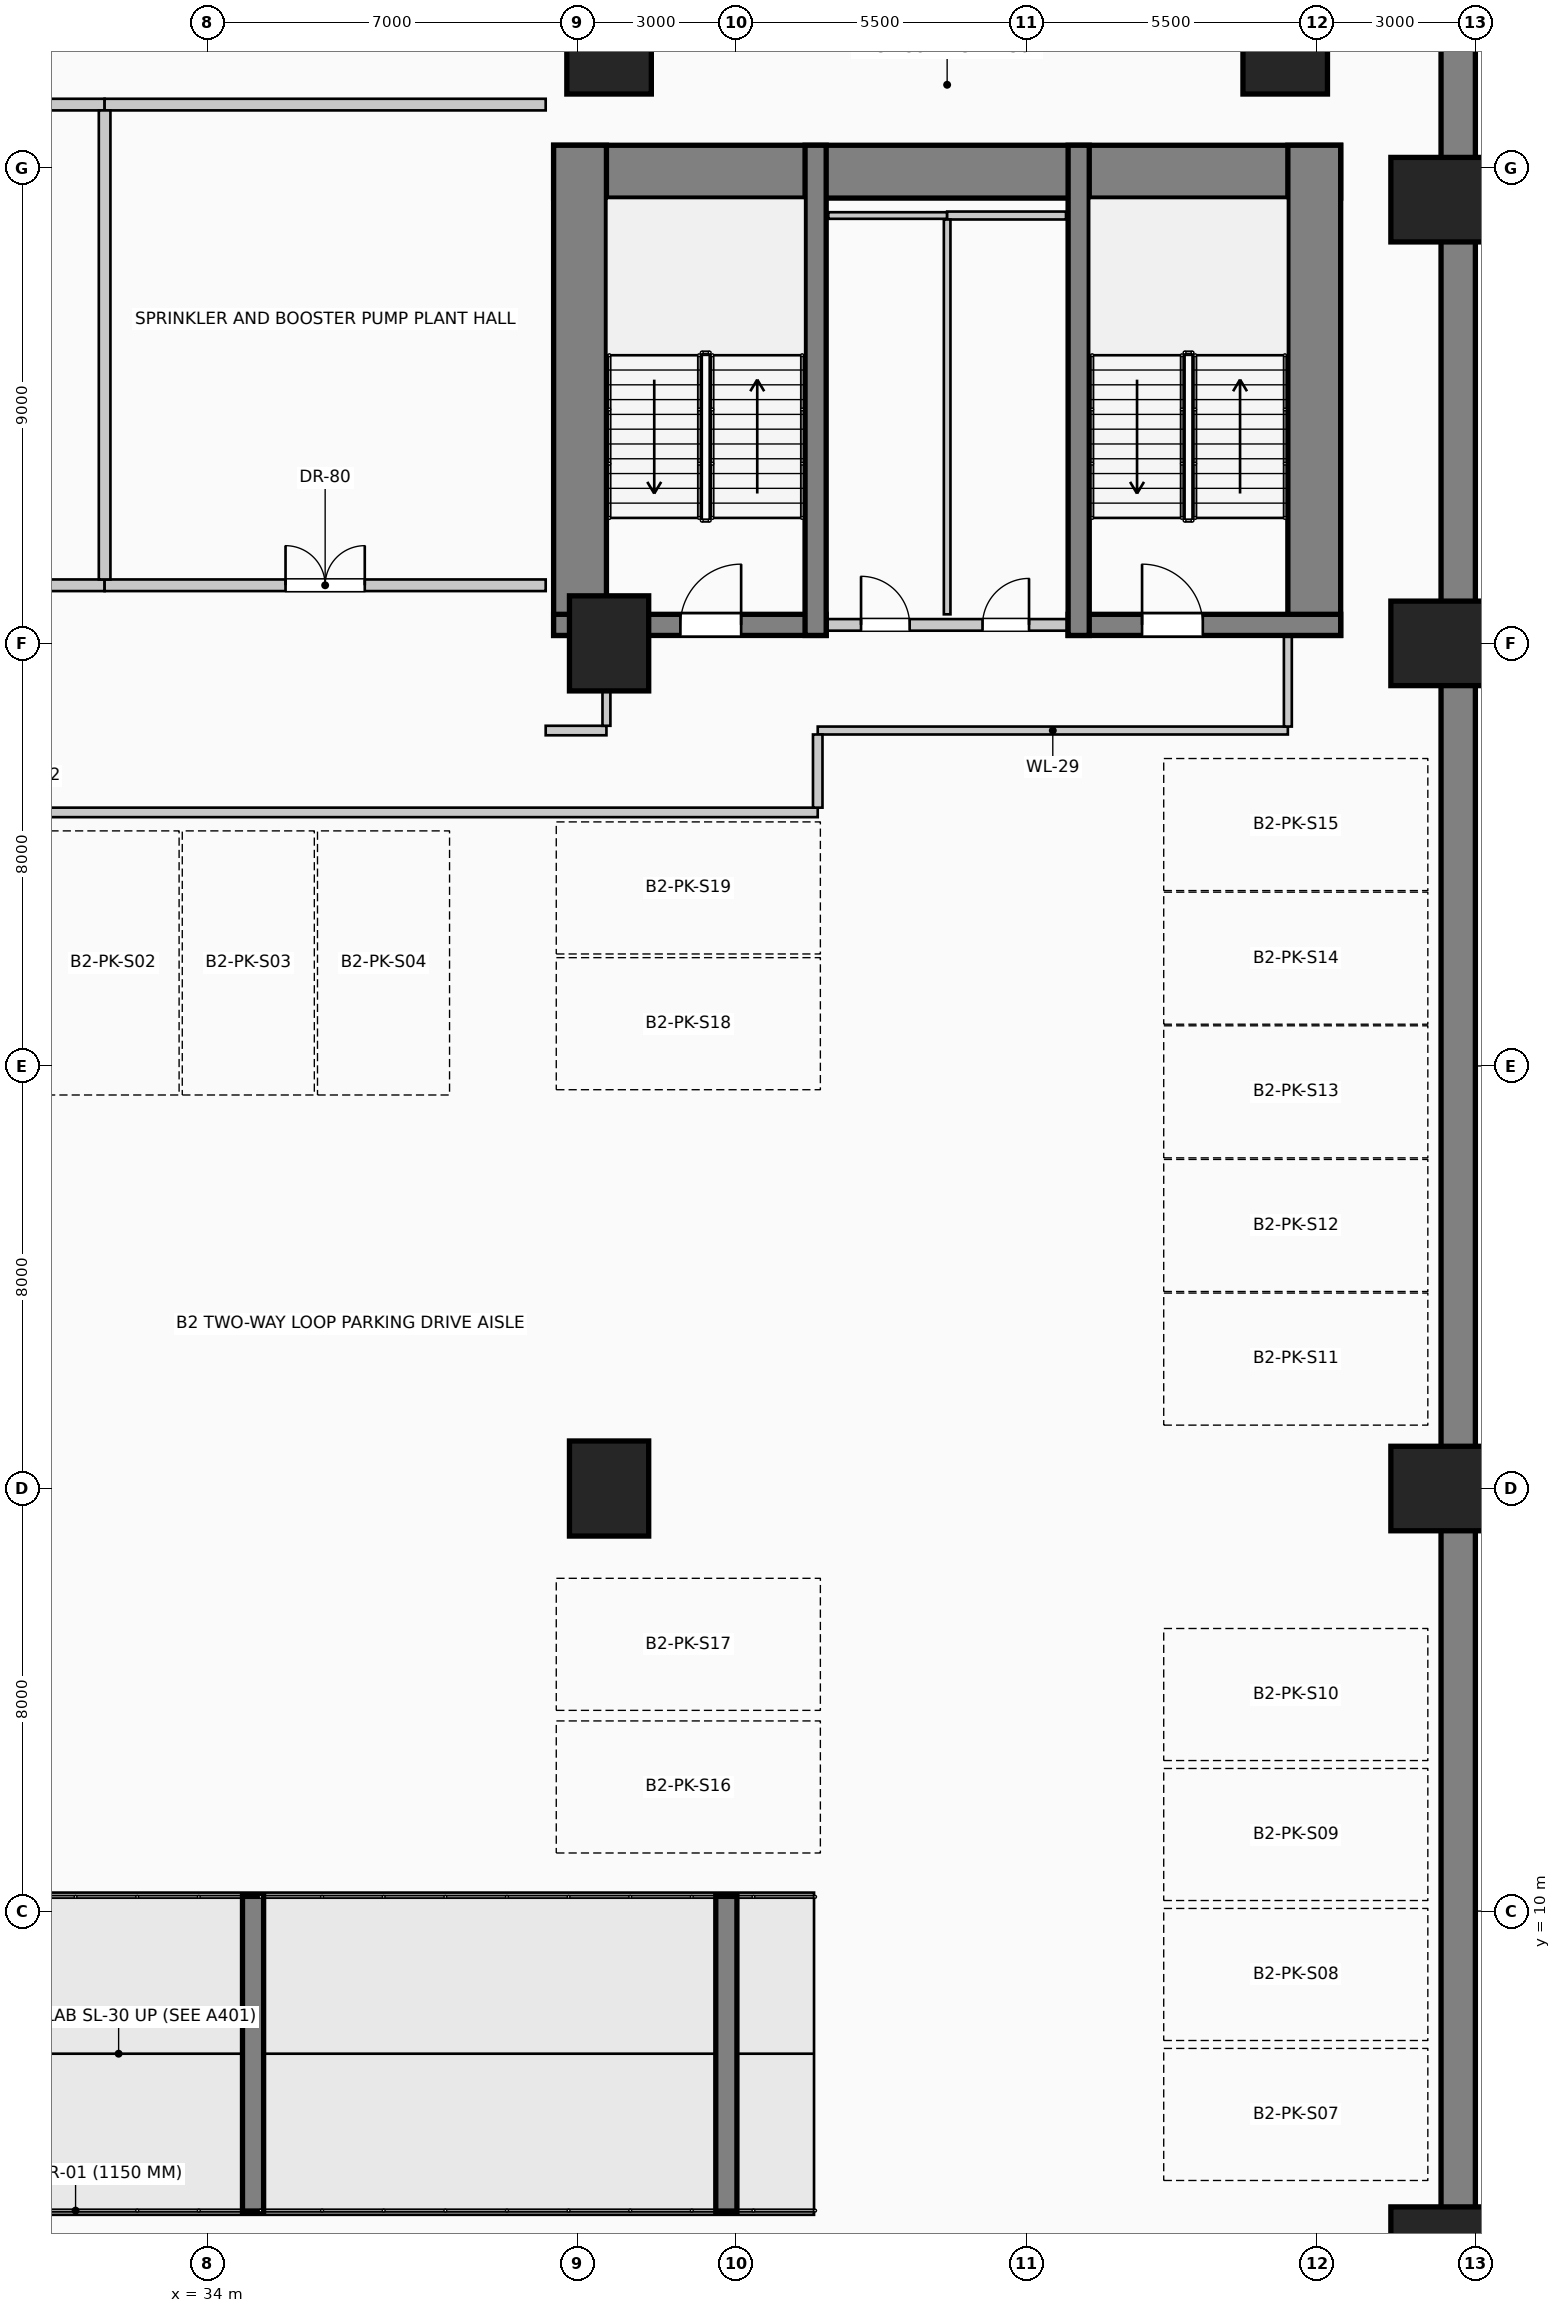
"""IFC4 building model, lengths in metres.
Left out: names, types, materials, properties, quantities, classifications, styles, units other than length and angle.
Written with IfcOpenShell. Run it as: python <this file> out.ifc"""

import sys

from ifc_helpers import new_model, si_unit, direction, frame, frame_2d, origin, origin_2d, place, context, subcontext, project, spatial, rectangle, extrude, element, fill, save


model = new_model("IFC4")
c1 = context("Model", 3, precision=1e-05, world=origin(), true_north=direction((0.0, 1.0)))
c2 = subcontext(c1, "Body", "Model", "MODEL_VIEW")
j1 = project(units=[si_unit("LENGTHUNIT", "METRE"), si_unit("PLANEANGLEUNIT", "RADIAN")], contexts=[c1])
p1 = place(None, origin())
s1 = spatial("IfcSite", under=j1, at=p1, CompositionType="ELEMENT")
p2 = place(p1, origin())
s2 = spatial("IfcBuilding", under=s1, at=p2, CompositionType="ELEMENT")
p3 = place(p2, frame((0.0, 0.0, -9.0)))
s3 = spatial("IfcBuildingStorey", under=s2, at=p3, CompositionType="ELEMENT", Elevation=-9.0)
p4 = place(p3, frame((57.675, 46.0, 0.0), z_axis=(0.0, 0.0, 1.0), x_axis=(0.0, -1.0, 0.0)))
e1 = element("IfcWall", 1, at=p4, inside=s3, PredefinedType="SOLIDWALL", context=c2, shape_type="SweptSolid", body=[
    extrude(rectangle(XDim=46.0, YDim=0.65, at=frame_2d((23.0, 0.0))), origin(), (0.0, 0.0, 1.0), 4.5),
])
p5 = place(p3, frame((40.55, 42.93, 0.0), z_axis=(0.0, 0.0, 1.0), x_axis=(1.0, 0.0, 0.0)))
e2 = element("IfcWall", 2, at=p5, inside=s3, PredefinedType="SHEAR", context=c2, shape_type="SweptSolid", body=[
    extrude(rectangle(XDim=14.9, YDim=1.0, at=frame_2d((7.45, 0.0))), origin(), (0.0, 0.0, 1.0), 4.5),
])
for number, where, z_axis, x_axis in (
    (3, (41.05, 34.15, 0.0), (0.0, 0.0, 1.0), (0.0, 1.0, 0.0)),
    (4, (54.95, 34.15, 0.0), (0.0, 0.0, 1.0), (0.0, 1.0, 0.0)),
):
    element("IfcWall", number, at=place(p3, frame(where, z_axis=z_axis, x_axis=x_axis)), inside=s3, PredefinedType="SHEAR", context=c2, shape_type="SweptSolid", body=[
        extrude(rectangle(XDim=9.28, YDim=1.0, at=frame_2d((4.64, 0.0))), origin(), (0.0, 0.0, 1.0), 4.5),
    ])
p6 = place(p3, frame((40.55, 34.35, 0.0), z_axis=(0.0, 0.0, 1.0), x_axis=(1.0, 0.0, 0.0)))
e5 = element("IfcWall", 5, at=p6, inside=s3, PredefinedType="SHEAR", context=c2, shape_type="SweptSolid", body=[
    extrude(rectangle(XDim=5.16, YDim=0.4, at=frame_2d((2.58, 0.0))), origin(), (0.0, 0.0, 1.0), 4.5),
])
p7 = place(p6, frame((2.4, 0.0, 0.0)))
e6 = element("IfcOpeningElement", 6, at=p7, cuts=e5, PredefinedType="OPENING", context=c2, shape_type="SweptSolid", body=[
    extrude(rectangle(XDim=1.15, YDim=2.2, at=frame_2d((0.575, 1.1))), frame((0.0, 0.21, 0.0), z_axis=(0.0, -1.0, 0.0), x_axis=(1.0, 0.0, 0.0)), (0.0, 0.0, 1.0), 0.42),
])
p8 = place(p3, frame((45.51, 34.15, 0.0), z_axis=(0.0, 0.0, 1.0), x_axis=(0.0, 1.0, 0.0)))
e7 = element("IfcWall", 7, at=p8, inside=s3, PredefinedType="SHEAR", context=c2, shape_type="SweptSolid", body=[
    extrude(rectangle(XDim=9.28, YDim=0.4, at=frame_2d((4.64, 0.0))), origin(), (0.0, 0.0, 1.0), 4.5),
])
p9 = place(p3, frame((50.29, 34.35, 0.0), z_axis=(0.0, 0.0, 1.0), x_axis=(1.0, 0.0, 0.0)))
e8 = element("IfcWall", 8, at=p9, inside=s3, PredefinedType="SHEAR", context=c2, shape_type="SweptSolid", body=[
    extrude(rectangle(XDim=5.16, YDim=0.4, at=frame_2d((2.58, 0.0))), origin(), (0.0, 0.0, 1.0), 4.5),
])
p10 = place(p9, frame((1.4, 0.0, 0.0)))
e9 = element("IfcOpeningElement", 9, at=p10, cuts=e8, PredefinedType="OPENING", context=c2, shape_type="SweptSolid", body=[
    extrude(rectangle(XDim=1.15, YDim=2.2, at=frame_2d((0.575, 1.1))), frame((0.0, 0.21, 0.0), z_axis=(0.0, -1.0, 0.0), x_axis=(1.0, 0.0, 0.0)), (0.0, 0.0, 1.0), 0.42),
])
p11 = place(p3, frame((50.49, 34.15, 0.0), z_axis=(0.0, 0.0, 1.0), x_axis=(0.0, 1.0, 0.0)))
e10 = element("IfcWall", 10, at=p11, inside=s3, PredefinedType="SHEAR", context=c2, shape_type="SweptSolid", body=[
    extrude(rectangle(XDim=9.28, YDim=0.4, at=frame_2d((4.64, 0.0))), origin(), (0.0, 0.0, 1.0), 4.5),
])
for number, where, z_axis, x_axis in (
    (11, (41.6, 45.4, 0.0), (0.0, 0.0, 1.0), (1.0, 0.0, 0.0)),
    (12, (54.4, 45.4, 0.0), (0.0, 0.0, 1.0), (1.0, 0.0, 0.0)),
    (13, (57.4, 3.6, 0.0), (0.0, 0.0, 1.0), (0.0, 1.0, 0.0)),
    (14, (57.4, 18.0, 0.0), (0.0, 0.0, 1.0), (0.0, 1.0, 0.0)),
    (15, (57.4, 34.0, 0.0), (0.0, 0.0, 1.0), (0.0, 1.0, 0.0)),
    (16, (57.4, 42.4, 0.0), (0.0, 0.0, 1.0), (0.0, 1.0, 0.0)),
):
    element("IfcColumn", number, at=place(p3, frame(where, z_axis=z_axis, x_axis=x_axis)), inside=s3, PredefinedType="COLUMN", context=c2, shape_type="SweptSolid", body=[
        extrude(rectangle(XDim=1.6, YDim=2.0, at=origin_2d()), origin(), (0.0, 0.0, 1.0), 4.5),
    ])
for number, where, z_axis, x_axis in (
    (17, (41.6, 18.0, 0.0), (0.0, 0.0, 1.0), (1.0, 0.0, 0.0)),
    (18, (41.6, 34.0, 0.0), (0.0, 0.0, 1.0), (1.0, 0.0, 0.0)),
):
    element("IfcColumn", number, at=place(p3, frame(where, z_axis=z_axis, x_axis=x_axis)), inside=s3, PredefinedType="COLUMN", context=c2, shape_type="SweptSolid", body=[
        extrude(rectangle(XDim=1.5, YDim=1.8, at=origin_2d()), origin(), (0.0, 0.0, 1.0), 4.5),
    ])
p12 = place(p3, frame((34.86, 4.3, 0.0), z_axis=(0.0, 0.0, 1.0), x_axis=(0.0, 1.0, 0.0)))
e19 = element("IfcWall", 19, at=p12, inside=s3, PredefinedType="SHEAR", context=c2, shape_type="SweptSolid", body=[
    extrude(rectangle(XDim=6.0, YDim=0.4, at=frame_2d((3.0, 0.0))), origin(), (0.0, 0.0, 1.0), 2.532),
])
p13 = place(p3, frame((43.82, 4.3, 0.0), z_axis=(0.0, 0.0, 1.0), x_axis=(0.0, 1.0, 0.0)))
e20 = element("IfcWall", 20, at=p13, inside=s3, PredefinedType="SHEAR", context=c2, shape_type="SweptSolid", body=[
    extrude(rectangle(XDim=6.0, YDim=0.4, at=frame_2d((3.0, 0.0))), origin(), (0.0, 0.0, 1.0), 3.972),
])
p14 = place(p3, frame((45.72, 34.35, 0.0), z_axis=(0.0, 0.0, 1.0), x_axis=(1.0, 0.0, 0.0)))
e21 = element("IfcWall", 21, at=p14, inside=s3, PredefinedType="PARTITIONING", context=c2, shape_type="SweptSolid", body=[
    extrude(rectangle(XDim=4.56, YDim=0.22, at=frame_2d((2.28, 0.0))), origin(), (0.0, 0.0, 1.0), 3.145),
])
p15 = place(p14, frame((0.65, 0.0, 0.0)))
e22 = element("IfcOpeningElement", 22, at=p15, cuts=e21, PredefinedType="OPENING", context=c2, shape_type="SweptSolid", body=[
    extrude(rectangle(XDim=0.92, YDim=2.1, at=frame_2d((0.46, 1.05))), frame((0.0, 0.12, 0.0), z_axis=(0.0, -1.0, 0.0), x_axis=(1.0, 0.0, 0.0)), (0.0, 0.0, 1.0), 0.24),
])
p16 = place(p14, frame((2.95, 0.0, 0.0)))
e23 = element("IfcOpeningElement", 23, at=p16, cuts=e21, PredefinedType="OPENING", context=c2, shape_type="SweptSolid", body=[
    extrude(rectangle(XDim=0.88, YDim=2.1, at=frame_2d((0.44, 1.05))), frame((0.0, 0.12, 0.0), z_axis=(0.0, -1.0, 0.0), x_axis=(1.0, 0.0, 0.0)), (0.0, 0.0, 1.0), 0.24),
])
p17 = place(p3, frame((15.85, 30.8, 0.0), z_axis=(0.0, 0.0, 1.0), x_axis=(1.0, 0.0, 0.0)))
e24 = element("IfcWall", 24, at=p17, inside=s3, PredefinedType="PARTITIONING", context=c2, shape_type="SweptSolid", body=[
    extrude(rectangle(XDim=29.7, YDim=0.18, at=frame_2d((14.85, 0.0))), origin(), (0.0, 0.0, 1.0), 4.1),
])
p18 = place(p3, frame((40.4, 32.35, 0.0), z_axis=(0.0, 0.0, 1.0), x_axis=(1.0, 0.0, 0.0)))
e25 = element("IfcWall", 25, at=p18, inside=s3, PredefinedType="PARTITIONING", context=c2, shape_type="SweptSolid", body=[
    extrude(rectangle(XDim=1.15, YDim=0.18, at=frame_2d((0.575, 0.0))), origin(), (0.0, 0.0, 1.0), 4.1),
])
p19 = place(p3, frame((45.55, 32.35, 0.0), z_axis=(0.0, 0.0, 1.0), x_axis=(1.0, 0.0, 0.0)))
e26 = element("IfcWall", 26, at=p19, inside=s3, PredefinedType="PARTITIONING", context=c2, shape_type="SweptSolid", body=[
    extrude(rectangle(XDim=8.9, YDim=0.15, at=frame_2d((4.45, 0.0))), origin(), (0.0, 0.0, 1.0), 4.1),
])
p20 = place(p3, frame((30.2, 35.1, 0.0), z_axis=(0.0, 0.0, 1.0), x_axis=(1.0, 0.0, 0.0)))
e27 = element("IfcWall", 27, at=p20, inside=s3, PredefinedType="PARTITIONING", context=c2, shape_type="SweptSolid", body=[
    extrude(rectangle(XDim=1.85, YDim=0.22, at=frame_2d((0.925, 0.0))), origin(), (0.0, 0.0, 1.0), 4.1),
])
p21 = place(p3, frame((32.05, 35.1, 0.0), z_axis=(0.0, 0.0, 1.0), x_axis=(1.0, 0.0, 0.0)))
e28 = element("IfcWall", 28, at=p21, inside=s3, PredefinedType="PARTITIONING", context=c2, shape_type="SweptSolid", body=[
    extrude(rectangle(XDim=8.35, YDim=0.22, at=frame_2d((4.175, 0.0))), origin(), (0.0, 0.0, 1.0), 4.1),
])
p22 = place(p21, frame((3.425, 0.0, 0.0)))
e29 = element("IfcOpeningElement", 29, at=p22, cuts=e28, PredefinedType="OPENING", context=c2, shape_type="SweptSolid", body=[
    extrude(rectangle(XDim=1.5, YDim=2.25, at=frame_2d((0.75, 1.125))), frame((0.0, 0.12, 0.0), z_axis=(0.0, -1.0, 0.0), x_axis=(1.0, 0.0, 0.0)), (0.0, 0.0, 1.0), 0.24),
])
p23 = place(p3, frame((45.75, 42.1, 0.0), z_axis=(0.0, 0.0, 1.0), x_axis=(1.0, 0.0, 0.0)))
e30 = element("IfcWall", 30, at=p23, inside=s3, PredefinedType="PARTITIONING", context=c2, shape_type="SweptSolid", body=[
    extrude(rectangle(XDim=2.25, YDim=0.125, at=frame_2d((1.125, 0.0))), origin(), (0.0, 0.0, 1.0), 4.1),
])
p24 = place(p3, frame((48.0, 42.1, 0.0), z_axis=(0.0, 0.0, 1.0), x_axis=(1.0, 0.0, 0.0)))
e31 = element("IfcWall", 31, at=p24, inside=s3, PredefinedType="PARTITIONING", context=c2, shape_type="SweptSolid", body=[
    extrude(rectangle(XDim=2.25, YDim=0.15, at=frame_2d((1.125, 0.0))), origin(), (0.0, 0.0, 1.0), 4.1),
])
p25 = place(p3, frame((17.55, 44.2, 0.0), z_axis=(0.0, 0.0, 1.0), x_axis=(1.0, 0.0, 0.0)))
e32 = element("IfcWall", 32, at=p25, inside=s3, PredefinedType="PARTITIONING", context=c2, shape_type="SweptSolid", body=[
    extrude(rectangle(XDim=14.5, YDim=0.22, at=frame_2d((7.25, 0.0))), origin(), (0.0, 0.0, 1.0), 4.1),
])
p26 = place(p3, frame((32.05, 44.2, 0.0), z_axis=(0.0, 0.0, 1.0), x_axis=(1.0, 0.0, 0.0)))
e33 = element("IfcWall", 33, at=p26, inside=s3, PredefinedType="PARTITIONING", context=c2, shape_type="SweptSolid", body=[
    extrude(rectangle(XDim=8.35, YDim=0.22, at=frame_2d((4.175, 0.0))), origin(), (0.0, 0.0, 1.0), 4.1),
])
p27 = place(p3, frame((32.05, 35.21, 0.0), z_axis=(0.0, 0.0, 1.0), x_axis=(0.0, 1.0, 0.0)))
e34 = element("IfcWall", 34, at=p27, inside=s3, PredefinedType="PARTITIONING", context=c2, shape_type="SweptSolid", body=[
    extrude(rectangle(XDim=8.88, YDim=0.22, at=frame_2d((4.44, 0.0))), origin(), (0.0, 0.0, 1.0), 4.1),
])
p28 = place(p3, frame((41.55, 32.44, 0.0), z_axis=(0.0, 0.0, 1.0), x_axis=(0.0, 1.0, 0.0)))
e35 = element("IfcWall", 35, at=p28, inside=s3, PredefinedType="PARTITIONING", context=c2, shape_type="SweptSolid", body=[
    extrude(rectangle(XDim=0.66, YDim=0.15, at=frame_2d((0.33, 0.0))), origin(), (0.0, 0.0, 1.0), 3.145),
])
p29 = place(p3, frame((45.55, 30.89, 0.0), z_axis=(0.0, 0.0, 1.0), x_axis=(0.0, 1.0, 0.0)))
e36 = element("IfcWall", 36, at=p29, inside=s3, PredefinedType="PARTITIONING", context=c2, shape_type="SweptSolid", body=[
    extrude(rectangle(XDim=1.385, YDim=0.18, at=frame_2d((0.692, 0.0))), origin(), (0.0, 0.0, 1.0), 4.1),
])
p30 = place(p3, frame((48.0, 34.55, 0.0), z_axis=(0.0, 0.0, 1.0), x_axis=(0.0, 1.0, 0.0)))
e37 = element("IfcWall", 37, at=p30, inside=s3, PredefinedType="PARTITIONING", context=c2, shape_type="SweptSolid", body=[
    extrude(rectangle(XDim=7.475, YDim=0.125, at=frame_2d((3.737, 0.0))), origin(), (0.0, 0.0, 1.0), 4.1),
])
p31 = place(p3, frame((54.45, 32.425, 0.0), z_axis=(0.0, 0.0, 1.0), x_axis=(0.0, 1.0, 0.0)))
e38 = element("IfcWall", 38, at=p31, inside=s3, PredefinedType="PARTITIONING", context=c2, shape_type="SweptSolid", body=[
    extrude(rectangle(XDim=1.725, YDim=0.15, at=frame_2d((0.862, 0.0))), origin(), (0.0, 0.0, 1.0), 4.1),
])
p32 = place(p7, origin())
e39 = element("IfcDoor", 39, at=p32, inside=s3, OperationType="SINGLE_SWING_RIGHT", PredefinedType="DOOR", context=c2, shape_type="SweptSolid", body=[
    extrude(rectangle(XDim=1.15, YDim=2.2, at=frame_2d((0.575, 1.1))), frame((0.0, 0.025, 0.0), z_axis=(0.0, -1.0, 0.0), x_axis=(1.0, 0.0, 0.0)), (0.0, 0.0, 1.0), 0.05),
])
fill(e6, e39)
p33 = place(p15, origin())
e40 = element("IfcDoor", 40, at=p33, inside=s3, OperationType="SINGLE_SWING_LEFT", PredefinedType="DOOR", context=c2, shape_type="SweptSolid", body=[
    extrude(rectangle(XDim=0.92, YDim=2.1, at=frame_2d((0.46, 1.05))), frame((0.0, 0.025, 0.0), z_axis=(0.0, -1.0, 0.0), x_axis=(1.0, 0.0, 0.0)), (0.0, 0.0, 1.0), 0.05),
])
fill(e22, e40)
p34 = place(p16, origin())
e41 = element("IfcDoor", 41, at=p34, inside=s3, OperationType="SINGLE_SWING_RIGHT", PredefinedType="DOOR", context=c2, shape_type="SweptSolid", body=[
    extrude(rectangle(XDim=0.88, YDim=2.1, at=frame_2d((0.44, 1.05))), frame((0.0, 0.025, 0.0), z_axis=(0.0, -1.0, 0.0), x_axis=(1.0, 0.0, 0.0)), (0.0, 0.0, 1.0), 0.05),
])
fill(e23, e41)
p35 = place(p10, origin())
e42 = element("IfcDoor", 42, at=p35, inside=s3, OperationType="SINGLE_SWING_LEFT", PredefinedType="DOOR", context=c2, shape_type="SweptSolid", body=[
    extrude(rectangle(XDim=1.15, YDim=2.2, at=frame_2d((0.575, 1.1))), frame((0.0, 0.025, 0.0), z_axis=(0.0, -1.0, 0.0), x_axis=(1.0, 0.0, 0.0)), (0.0, 0.0, 1.0), 0.05),
])
fill(e9, e42)
p36 = place(p22, origin())
e43 = element("IfcDoor", 43, at=p36, inside=s3, OperationType="DOUBLE_DOOR_SINGLE_SWING", PredefinedType="DOOR", context=c2, shape_type="SweptSolid", body=[
    extrude(rectangle(XDim=1.5, YDim=2.25, at=frame_2d((0.75, 1.125))), frame((0.0, 0.025, 0.0), z_axis=(0.0, -1.0, 0.0), x_axis=(1.0, 0.0, 0.0)), (0.0, 0.0, 1.0), 0.05),
])
fill(e29, e43)
save(model, sys.argv[1])
